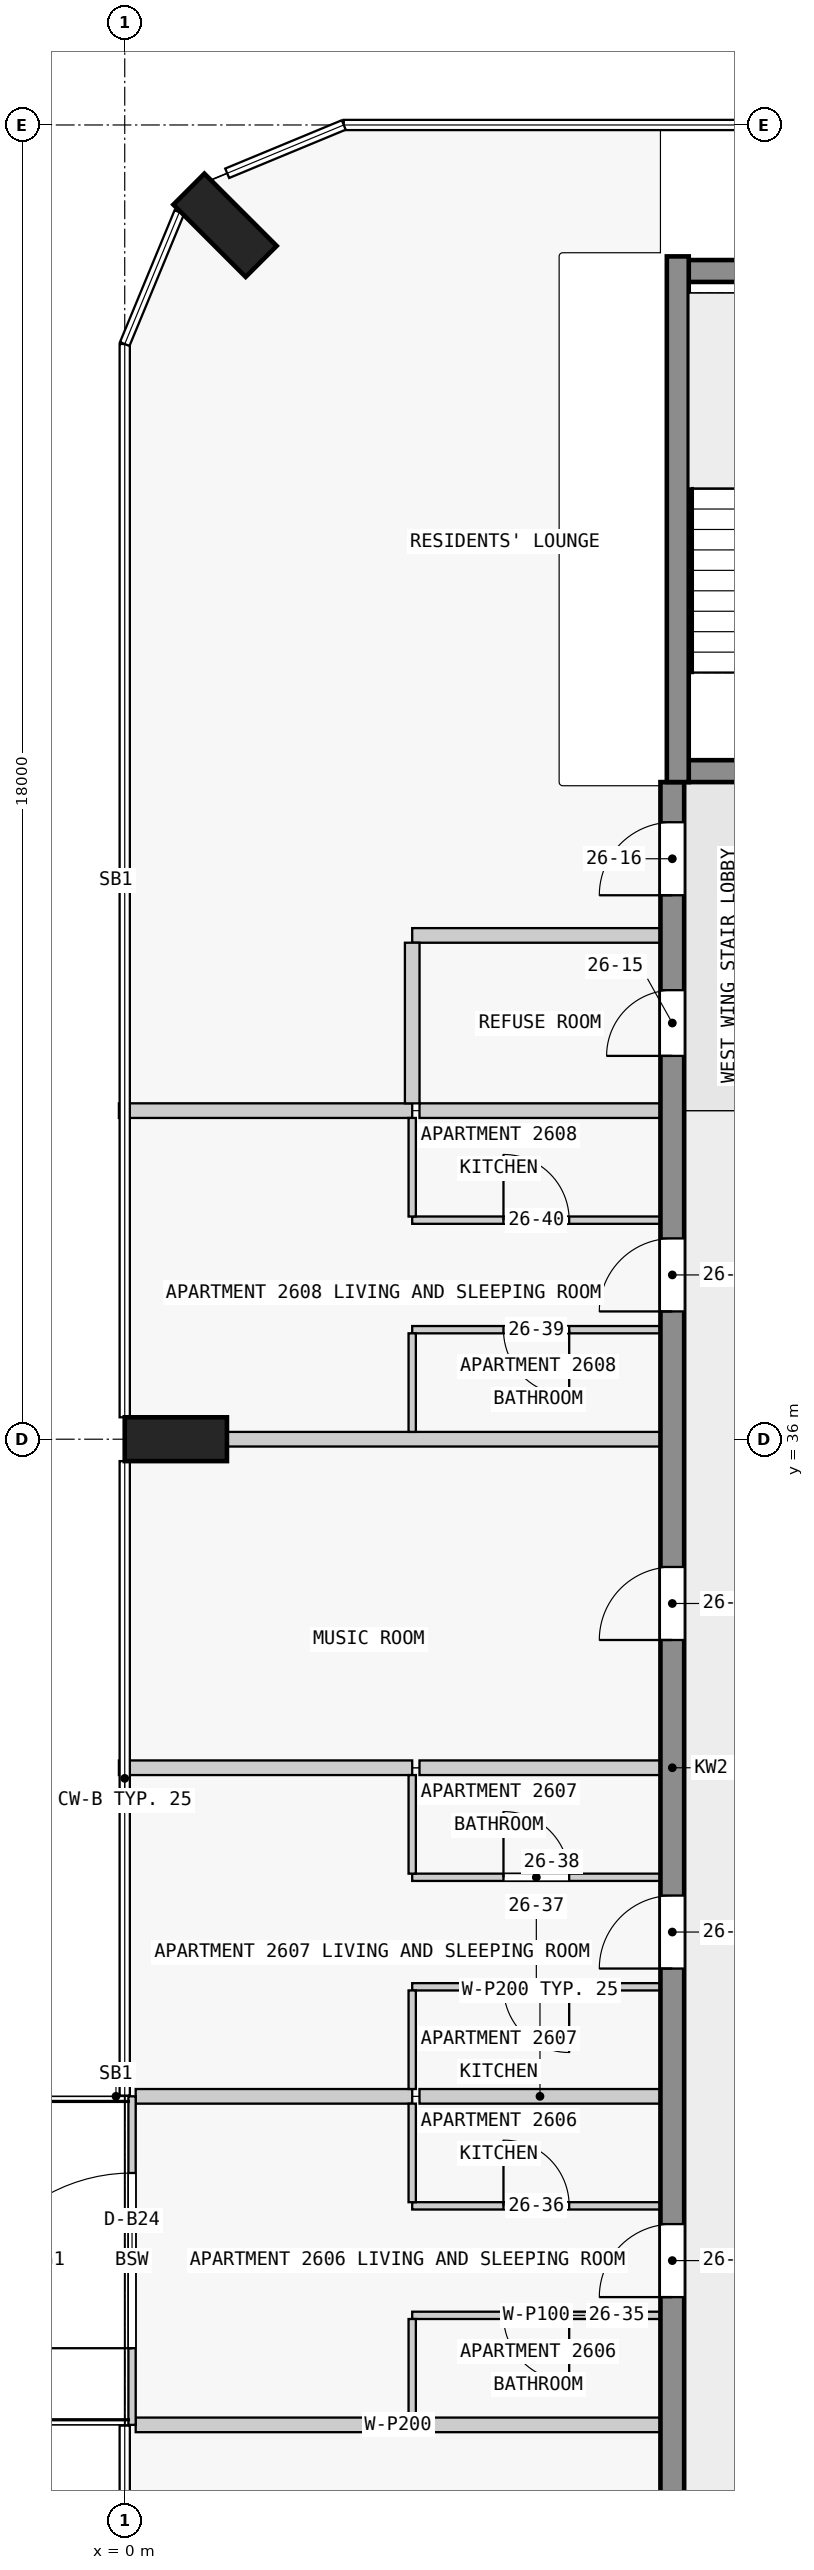
"""IFC4 building model, lengths in metres.
Left out: names, types, materials, properties, quantities, classifications, styles, units other than length and angle.
Written with IfcOpenShell. Run it as: python <this file> out.ifc"""

import sys

from ifc_helpers import new_model, si_unit, direction, frame, frame_2d, origin, origin_2d, place, context, subcontext, project, spatial, rectangle, extrude, element, fill, save


model = new_model("IFC4")
c1 = context("Model", 3, precision=1e-05, world=origin(), true_north=direction((0.0, 1.0)))
c2 = subcontext(c1, "Body", "Model", "MODEL_VIEW")
j1 = project(units=[si_unit("LENGTHUNIT", "METRE"), si_unit("PLANEANGLEUNIT", "RADIAN")], contexts=[c1])
p1 = place(None, origin())
s1 = spatial("IfcSite", under=j1, at=p1, CompositionType="ELEMENT")
p2 = place(p1, origin())
s2 = spatial("IfcBuilding", under=s1, at=p2, CompositionType="ELEMENT")
p3 = place(p2, frame((0.0, 0.0, 102.8)))
s3 = spatial("IfcBuildingStorey", under=s2, at=p3, CompositionType="ELEMENT", Elevation=102.8)
for number, where, z_axis, x_axis in (
    (1, (1.374, 52.626, 0.0), (0.0, 0.0, 1.0), (0.707, 0.707, 0.0)),
    (2, (0.7, 36.0, 0.0), (0.0, 0.0, 1.0), (0.0, 1.0, 0.0)),
):
    element("IfcColumn", number, at=place(p3, frame(where, z_axis=z_axis, x_axis=x_axis)), inside=s3, PredefinedType="COLUMN", context=c2, shape_type="SweptSolid", body=[
        extrude(rectangle(XDim=0.6, YDim=1.4, at=origin_2d()), origin(), (0.0, 0.0, 1.0), 3.5),
    ])
p4 = place(p3, frame((7.725, 45.15, 0.0), z_axis=(0.0, 0.0, 1.0), x_axis=(1.0, 0.0, 0.0)))
e3 = element("IfcWall", 3, at=p4, inside=s3, PredefinedType="SHEAR", context=c2, shape_type="SweptSolid", body=[
    extrude(rectangle(XDim=2.55, YDim=0.3, at=frame_2d((1.275, 0.0))), origin(), (0.0, 0.0, 1.0), 3.5),
])
p5 = place(p4, frame((0.725, 0.0, 0.0)))
e4 = element("IfcOpeningElement", 4, at=p5, cuts=e3, PredefinedType="OPENING", context=c2, shape_type="SweptSolid", body=[
    extrude(rectangle(XDim=1.1, YDim=2.1, at=frame_2d((0.55, 1.05))), frame((0.0, 0.16, 0.0), z_axis=(0.0, -1.0, 0.0), x_axis=(1.0, 0.0, 0.0)), (0.0, 0.0, 1.0), 0.32),
])
p6 = place(p3, frame((7.725, 52.0, 0.0), z_axis=(0.0, 0.0, 1.0), x_axis=(1.0, 0.0, 0.0)))
e5 = element("IfcWall", 5, at=p6, inside=s3, PredefinedType="SHEAR", context=c2, shape_type="SweptSolid", body=[
    extrude(rectangle(XDim=2.55, YDim=0.3, at=frame_2d((1.275, 0.0))), origin(), (0.0, 0.0, 1.0), 3.5),
])
p7 = place(p3, frame((7.575, 45.0, 0.0), z_axis=(0.0, 0.0, 1.0), x_axis=(0.0, 1.0, 0.0)))
e6 = element("IfcWall", 6, at=p7, inside=s3, PredefinedType="SHEAR", context=c2, shape_type="SweptSolid", body=[
    extrude(rectangle(XDim=7.2, YDim=0.3, at=frame_2d((3.6, 0.0))), origin(), (0.0, 0.0, 1.0), 3.5),
])
p8 = place(p3, frame((7.5, 18.0, 0.0), z_axis=(0.0, 0.0, 1.0), x_axis=(0.0, 1.0, 0.0)))
e7 = element("IfcWall", 7, at=p8, inside=s3, PredefinedType="SHEAR", context=c2, shape_type="SweptSolid", body=[
    extrude(rectangle(XDim=27.0, YDim=0.325, at=frame_2d((13.5, 0.0))), origin(), (0.0, 0.0, 1.0), 3.25),
])
p9 = place(p8, frame((1.75, 0.0, 0.0)))
e8 = element("IfcOpeningElement", 8, at=p9, cuts=e7, PredefinedType="OPENING", context=c2, shape_type="SweptSolid", body=[
    extrude(rectangle(XDim=1.0, YDim=2.1, at=frame_2d((0.5, 1.05))), frame((0.0, 0.172, 0.0), z_axis=(0.0, -1.0, 0.0), x_axis=(1.0, 0.0, 0.0)), (0.0, 0.0, 1.0), 0.345),
])
p10 = place(p8, frame((6.25, 0.0, 0.0)))
e9 = element("IfcOpeningElement", 9, at=p10, cuts=e7, PredefinedType="OPENING", context=c2, shape_type="SweptSolid", body=[
    extrude(rectangle(XDim=1.0, YDim=2.1, at=frame_2d((0.5, 1.05))), frame((0.0, 0.172, 0.0), z_axis=(0.0, -1.0, 0.0), x_axis=(1.0, 0.0, 0.0)), (0.0, 0.0, 1.0), 0.345),
])
p11 = place(p8, frame((10.75, 0.0, 0.0)))
e10 = element("IfcOpeningElement", 10, at=p11, cuts=e7, PredefinedType="OPENING", context=c2, shape_type="SweptSolid", body=[
    extrude(rectangle(XDim=1.0, YDim=2.1, at=frame_2d((0.5, 1.05))), frame((0.0, 0.172, 0.0), z_axis=(0.0, -1.0, 0.0), x_axis=(1.0, 0.0, 0.0)), (0.0, 0.0, 1.0), 0.345),
])
p12 = place(p8, frame((15.25, 0.0, 0.0)))
e11 = element("IfcOpeningElement", 11, at=p12, cuts=e7, PredefinedType="OPENING", context=c2, shape_type="SweptSolid", body=[
    extrude(rectangle(XDim=1.0, YDim=2.1, at=frame_2d((0.5, 1.05))), frame((0.0, 0.172, 0.0), z_axis=(0.0, -1.0, 0.0), x_axis=(1.0, 0.0, 0.0)), (0.0, 0.0, 1.0), 0.345),
])
p13 = place(p8, frame((19.75, 0.0, 0.0)))
e12 = element("IfcOpeningElement", 12, at=p13, cuts=e7, PredefinedType="OPENING", context=c2, shape_type="SweptSolid", body=[
    extrude(rectangle(XDim=1.0, YDim=2.1, at=frame_2d((0.5, 1.05))), frame((0.0, 0.172, 0.0), z_axis=(0.0, -1.0, 0.0), x_axis=(1.0, 0.0, 0.0)), (0.0, 0.0, 1.0), 0.345),
])
p14 = place(p8, frame((23.25, 0.0, 0.0)))
e13 = element("IfcOpeningElement", 13, at=p14, cuts=e7, PredefinedType="OPENING", context=c2, shape_type="SweptSolid", body=[
    extrude(rectangle(XDim=0.9, YDim=2.1, at=frame_2d((0.45, 1.05))), frame((0.0, 0.172, 0.0), z_axis=(0.0, -1.0, 0.0), x_axis=(1.0, 0.0, 0.0)), (0.0, 0.0, 1.0), 0.345),
])
p15 = place(p8, frame((25.45, 0.0, 0.0)))
e14 = element("IfcOpeningElement", 14, at=p15, cuts=e7, PredefinedType="OPENING", context=c2, shape_type="SweptSolid", body=[
    extrude(rectangle(XDim=1.0, YDim=2.1, at=frame_2d((0.5, 1.05))), frame((0.0, 0.172, 0.0), z_axis=(0.0, -1.0, 0.0), x_axis=(1.0, 0.0, 0.0)), (0.0, 0.0, 1.0), 0.345),
])
p16 = place(p3, frame((0.1, 22.5, 0.0), z_axis=(0.0, 0.0, 1.0), x_axis=(0.0, 1.0, 0.0)))
e15 = element("IfcWall", 15, at=p16, inside=s3, PredefinedType="STANDARD", context=c2, shape_type="SweptSolid", body=[
    extrude(rectangle(XDim=4.5, YDim=0.1, at=frame_2d((2.25, 0.0))), origin(), (0.0, 0.0, 1.0), 3.25),
])
p17 = place(p16, frame((1.05, 0.0, 0.0)))
e16 = element("IfcOpeningElement", 16, at=p17, cuts=e15, PredefinedType="OPENING", context=c2, shape_type="SweptSolid", body=[
    extrude(rectangle(XDim=2.4, YDim=2.4, at=frame_2d((1.2, 1.2))), frame((0.0, 0.06, 0.0), z_axis=(0.0, -1.0, 0.0), x_axis=(1.0, 0.0, 0.0)), (0.0, 0.0, 1.0), 0.12),
])
p18 = place(p3, frame((7.337, 22.5, 0.0), z_axis=(0.0, 0.0, 1.0), x_axis=(-1.0, 0.0, 0.0)))
e17 = element("IfcWall", 17, at=p18, inside=s3, PredefinedType="PARTITIONING", context=c2, shape_type="SweptSolid", body=[
    extrude(rectangle(XDim=7.188, YDim=0.2, at=frame_2d((3.594, 0.0))), origin(), (0.0, 0.0, 1.0), 3.25),
])
p19 = place(p3, frame((7.337, 24.0, 0.0), z_axis=(0.0, 0.0, 1.0), x_axis=(-1.0, 0.0, 0.0)))
e18 = element("IfcWall", 18, at=p19, inside=s3, PredefinedType="PARTITIONING", context=c2, shape_type="SweptSolid", body=[
    extrude(rectangle(XDim=3.4, YDim=0.1, at=frame_2d((1.7, 0.0))), origin(), (0.0, 0.0, 1.0), 3.25),
])
p20 = place(p19, frame((1.25, 0.0, 0.0)))
e19 = element("IfcOpeningElement", 19, at=p20, cuts=e18, PredefinedType="OPENING", context=c2, shape_type="SweptSolid", body=[
    extrude(rectangle(XDim=0.9, YDim=2.1, at=frame_2d((0.45, 1.05))), frame((0.0, 0.06, 0.0), z_axis=(0.0, -1.0, 0.0), x_axis=(1.0, 0.0, 0.0)), (0.0, 0.0, 1.0), 0.12),
])
p21 = place(p3, frame((3.938, 25.5, 0.0), z_axis=(0.0, 0.0, 1.0), x_axis=(1.0, 0.0, 0.0)))
e20 = element("IfcWall", 20, at=p21, inside=s3, PredefinedType="PARTITIONING", context=c2, shape_type="SweptSolid", body=[
    extrude(rectangle(XDim=3.4, YDim=0.1, at=frame_2d((1.7, 0.0))), origin(), (0.0, 0.0, 1.0), 3.25),
])
p22 = place(p21, frame((1.25, 0.0, 0.0)))
e21 = element("IfcOpeningElement", 21, at=p22, cuts=e20, PredefinedType="OPENING", context=c2, shape_type="SweptSolid", body=[
    extrude(rectangle(XDim=0.9, YDim=2.1, at=frame_2d((0.45, 1.05))), frame((0.0, 0.06, 0.0), z_axis=(0.0, -1.0, 0.0), x_axis=(1.0, 0.0, 0.0)), (0.0, 0.0, 1.0), 0.12),
])
p23 = place(p3, frame((7.337, 27.0, 0.0), z_axis=(0.0, 0.0, 1.0), x_axis=(-1.0, 0.0, 0.0)))
e22 = element("IfcWall", 22, at=p23, inside=s3, PredefinedType="PARTITIONING", context=c2, shape_type="SweptSolid", body=[
    extrude(rectangle(XDim=3.3, YDim=0.2, at=frame_2d((1.65, 0.0))), origin(), (0.0, 0.0, 1.0), 3.25),
])
p24 = place(p3, frame((0.15, 27.0, 0.0), z_axis=(0.0, 0.0, 1.0), x_axis=(1.0, 0.0, 0.0)))
e23 = element("IfcWall", 23, at=p24, inside=s3, PredefinedType="PARTITIONING", context=c2, shape_type="SweptSolid", body=[
    extrude(rectangle(XDim=3.788, YDim=0.2, at=frame_2d((1.894, 0.0))), origin(), (0.0, 0.0, 1.0), 3.25),
])
p25 = place(p3, frame((7.337, 28.5, 0.0), z_axis=(0.0, 0.0, 1.0), x_axis=(-1.0, 0.0, 0.0)))
e24 = element("IfcWall", 24, at=p25, inside=s3, PredefinedType="PARTITIONING", context=c2, shape_type="SweptSolid", body=[
    extrude(rectangle(XDim=3.4, YDim=0.1, at=frame_2d((1.7, 0.0))), origin(), (0.0, 0.0, 1.0), 3.25),
])
p26 = place(p25, frame((1.25, 0.0, 0.0)))
e25 = element("IfcOpeningElement", 25, at=p26, cuts=e24, PredefinedType="OPENING", context=c2, shape_type="SweptSolid", body=[
    extrude(rectangle(XDim=0.9, YDim=2.1, at=frame_2d((0.45, 1.05))), frame((0.0, 0.06, 0.0), z_axis=(0.0, -1.0, 0.0), x_axis=(1.0, 0.0, 0.0)), (0.0, 0.0, 1.0), 0.12),
])
p27 = place(p3, frame((3.938, 30.0, 0.0), z_axis=(0.0, 0.0, 1.0), x_axis=(1.0, 0.0, 0.0)))
e26 = element("IfcWall", 26, at=p27, inside=s3, PredefinedType="PARTITIONING", context=c2, shape_type="SweptSolid", body=[
    extrude(rectangle(XDim=3.4, YDim=0.1, at=frame_2d((1.7, 0.0))), origin(), (0.0, 0.0, 1.0), 3.25),
])
p28 = place(p27, frame((1.25, 0.0, 0.0)))
e27 = element("IfcOpeningElement", 27, at=p28, cuts=e26, PredefinedType="OPENING", context=c2, shape_type="SweptSolid", body=[
    extrude(rectangle(XDim=0.9, YDim=2.1, at=frame_2d((0.45, 1.05))), frame((0.0, 0.06, 0.0), z_axis=(0.0, -1.0, 0.0), x_axis=(1.0, 0.0, 0.0)), (0.0, 0.0, 1.0), 0.12),
])
p29 = place(p3, frame((7.337, 31.5, 0.0), z_axis=(0.0, 0.0, 1.0), x_axis=(-1.0, 0.0, 0.0)))
e28 = element("IfcWall", 28, at=p29, inside=s3, PredefinedType="PARTITIONING", context=c2, shape_type="SweptSolid", body=[
    extrude(rectangle(XDim=3.3, YDim=0.2, at=frame_2d((1.65, 0.0))), origin(), (0.0, 0.0, 1.0), 3.25),
])
p30 = place(p3, frame((-0.08, 31.5, 0.0), z_axis=(0.0, 0.0, 1.0), x_axis=(1.0, 0.0, 0.0)))
e29 = element("IfcWall", 29, at=p30, inside=s3, PredefinedType="PARTITIONING", context=c2, shape_type="SweptSolid", body=[
    extrude(rectangle(XDim=4.018, YDim=0.2, at=frame_2d((2.009, 0.0))), origin(), (0.0, 0.0, 1.0), 3.25),
])
p31 = place(p3, frame((7.337, 36.0, 0.0), z_axis=(0.0, 0.0, 1.0), x_axis=(-1.0, 0.0, 0.0)))
e30 = element("IfcWall", 30, at=p31, inside=s3, PredefinedType="PARTITIONING", context=c2, shape_type="SweptSolid", body=[
    extrude(rectangle(XDim=5.938, YDim=0.2, at=frame_2d((2.969, 0.0))), origin(), (0.0, 0.0, 1.0), 3.25),
])
p32 = place(p3, frame((7.337, 37.5, 0.0), z_axis=(0.0, 0.0, 1.0), x_axis=(-1.0, 0.0, 0.0)))
e31 = element("IfcWall", 31, at=p32, inside=s3, PredefinedType="PARTITIONING", context=c2, shape_type="SweptSolid", body=[
    extrude(rectangle(XDim=3.4, YDim=0.1, at=frame_2d((1.7, 0.0))), origin(), (0.0, 0.0, 1.0), 3.25),
])
p33 = place(p32, frame((1.25, 0.0, 0.0)))
e32 = element("IfcOpeningElement", 32, at=p33, cuts=e31, PredefinedType="OPENING", context=c2, shape_type="SweptSolid", body=[
    extrude(rectangle(XDim=0.9, YDim=2.1, at=frame_2d((0.45, 1.05))), frame((0.0, 0.06, 0.0), z_axis=(0.0, -1.0, 0.0), x_axis=(1.0, 0.0, 0.0)), (0.0, 0.0, 1.0), 0.12),
])
p34 = place(p3, frame((3.938, 39.0, 0.0), z_axis=(0.0, 0.0, 1.0), x_axis=(1.0, 0.0, 0.0)))
e33 = element("IfcWall", 33, at=p34, inside=s3, PredefinedType="PARTITIONING", context=c2, shape_type="SweptSolid", body=[
    extrude(rectangle(XDim=3.4, YDim=0.1, at=frame_2d((1.7, 0.0))), origin(), (0.0, 0.0, 1.0), 3.25),
])
p35 = place(p34, frame((1.25, 0.0, 0.0)))
e34 = element("IfcOpeningElement", 34, at=p35, cuts=e33, PredefinedType="OPENING", context=c2, shape_type="SweptSolid", body=[
    extrude(rectangle(XDim=0.9, YDim=2.1, at=frame_2d((0.45, 1.05))), frame((0.0, 0.06, 0.0), z_axis=(0.0, -1.0, 0.0), x_axis=(1.0, 0.0, 0.0)), (0.0, 0.0, 1.0), 0.12),
])
p36 = place(p3, frame((7.337, 40.5, 0.0), z_axis=(0.0, 0.0, 1.0), x_axis=(-1.0, 0.0, 0.0)))
e35 = element("IfcWall", 35, at=p36, inside=s3, PredefinedType="PARTITIONING", context=c2, shape_type="SweptSolid", body=[
    extrude(rectangle(XDim=3.3, YDim=0.2, at=frame_2d((1.65, 0.0))), origin(), (0.0, 0.0, 1.0), 3.25),
])
p37 = place(p3, frame((-0.08, 40.5, 0.0), z_axis=(0.0, 0.0, 1.0), x_axis=(1.0, 0.0, 0.0)))
e36 = element("IfcWall", 36, at=p37, inside=s3, PredefinedType="PARTITIONING", context=c2, shape_type="SweptSolid", body=[
    extrude(rectangle(XDim=4.018, YDim=0.2, at=frame_2d((2.009, 0.0))), origin(), (0.0, 0.0, 1.0), 3.25),
])
p38 = place(p3, frame((7.337, 42.9, 0.0), z_axis=(0.0, 0.0, 1.0), x_axis=(-1.0, 0.0, 0.0)))
e37 = element("IfcWall", 37, at=p38, inside=s3, PredefinedType="PARTITIONING", context=c2, shape_type="SweptSolid", body=[
    extrude(rectangle(XDim=3.4, YDim=0.2, at=frame_2d((1.7, 0.0))), origin(), (0.0, 0.0, 1.0), 3.25),
])
for number, where, z_axis, x_axis in (
    (38, (3.938, 23.95, 0.0), (0.0, 0.0, 1.0), (0.0, -1.0, 0.0)),
    (39, (3.938, 26.9, 0.0), (0.0, 0.0, 1.0), (0.0, -1.0, 0.0)),
    (40, (3.938, 28.45, 0.0), (0.0, 0.0, 1.0), (0.0, -1.0, 0.0)),
    (41, (3.938, 31.4, 0.0), (0.0, 0.0, 1.0), (0.0, -1.0, 0.0)),
    (42, (3.938, 37.45, 0.0), (0.0, 0.0, 1.0), (0.0, -1.0, 0.0)),
    (43, (3.938, 40.4, 0.0), (0.0, 0.0, 1.0), (0.0, -1.0, 0.0)),
):
    element("IfcWall", number, at=place(p3, frame(where, z_axis=z_axis, x_axis=x_axis)), inside=s3, PredefinedType="PARTITIONING", context=c2, shape_type="SweptSolid", body=[
        extrude(rectangle(XDim=1.35, YDim=0.1, at=frame_2d((0.675, 0.0))), origin(), (0.0, 0.0, 1.0), 3.25),
    ])
p39 = place(p3, frame((3.938, 42.8, 0.0), z_axis=(0.0, 0.0, 1.0), x_axis=(0.0, -1.0, 0.0)))
e44 = element("IfcWall", 44, at=p39, inside=s3, PredefinedType="PARTITIONING", context=c2, shape_type="SweptSolid", body=[
    extrude(rectangle(XDim=2.2, YDim=0.2, at=frame_2d((1.1, 0.0))), origin(), (0.0, 0.0, 1.0), 3.25),
])
p40 = place(p17, origin())
e45 = element("IfcDoor", 45, at=p40, inside=s3, OperationType="SINGLE_SWING_LEFT", PredefinedType="DOOR", context=c2, shape_type="SweptSolid", body=[
    extrude(rectangle(XDim=2.4, YDim=2.4, at=frame_2d((1.2, 1.2))), frame((0.0, 0.025, 0.0), z_axis=(0.0, -1.0, 0.0), x_axis=(1.0, 0.0, 0.0)), (0.0, 0.0, 1.0), 0.05),
])
fill(e16, e45)
p41 = place(p10, origin())
e46 = element("IfcDoor", 46, at=p41, inside=s3, OperationType="SINGLE_SWING_LEFT", PredefinedType="DOOR", context=c2, shape_type="SweptSolid", body=[
    extrude(rectangle(XDim=1.0, YDim=2.1, at=frame_2d((0.5, 1.05))), frame((0.0, 0.025, 0.0), z_axis=(0.0, -1.0, 0.0), x_axis=(1.0, 0.0, 0.0)), (0.0, 0.0, 1.0), 0.05),
])
fill(e9, e46)
p42 = place(p11, origin())
e47 = element("IfcDoor", 47, at=p42, inside=s3, OperationType="SINGLE_SWING_LEFT", PredefinedType="DOOR", context=c2, shape_type="SweptSolid", body=[
    extrude(rectangle(XDim=1.0, YDim=2.1, at=frame_2d((0.5, 1.05))), frame((0.0, 0.025, 0.0), z_axis=(0.0, -1.0, 0.0), x_axis=(1.0, 0.0, 0.0)), (0.0, 0.0, 1.0), 0.05),
])
fill(e10, e47)
p43 = place(p12, origin())
e48 = element("IfcDoor", 48, at=p43, inside=s3, OperationType="SINGLE_SWING_RIGHT", PredefinedType="DOOR", context=c2, shape_type="SweptSolid", body=[
    extrude(rectangle(XDim=1.0, YDim=2.1, at=frame_2d((0.5, 1.05))), frame((0.0, 0.025, 0.0), z_axis=(0.0, -1.0, 0.0), x_axis=(1.0, 0.0, 0.0)), (0.0, 0.0, 1.0), 0.05),
])
fill(e11, e48)
p44 = place(p13, origin())
e49 = element("IfcDoor", 49, at=p44, inside=s3, OperationType="SINGLE_SWING_RIGHT", PredefinedType="DOOR", context=c2, shape_type="SweptSolid", body=[
    extrude(rectangle(XDim=1.0, YDim=2.1, at=frame_2d((0.5, 1.05))), frame((0.0, 0.025, 0.0), z_axis=(0.0, -1.0, 0.0), x_axis=(1.0, 0.0, 0.0)), (0.0, 0.0, 1.0), 0.05),
])
fill(e12, e49)
p45 = place(p14, origin())
e50 = element("IfcDoor", 50, at=p45, inside=s3, OperationType="SINGLE_SWING_RIGHT", PredefinedType="DOOR", context=c2, shape_type="SweptSolid", body=[
    extrude(rectangle(XDim=0.9, YDim=2.1, at=frame_2d((0.45, 1.05))), frame((0.0, 0.025, 0.0), z_axis=(0.0, -1.0, 0.0), x_axis=(1.0, 0.0, 0.0)), (0.0, 0.0, 1.0), 0.05),
])
fill(e13, e50)
p46 = place(p15, origin())
e51 = element("IfcDoor", 51, at=p46, inside=s3, OperationType="SINGLE_SWING_RIGHT", PredefinedType="DOOR", context=c2, shape_type="SweptSolid", body=[
    extrude(rectangle(XDim=1.0, YDim=2.1, at=frame_2d((0.5, 1.05))), frame((0.0, 0.025, 0.0), z_axis=(0.0, -1.0, 0.0), x_axis=(1.0, 0.0, 0.0)), (0.0, 0.0, 1.0), 0.05),
])
fill(e14, e51)
p47 = place(p20, origin())
e52 = element("IfcDoor", 52, at=p47, inside=s3, OperationType="SINGLE_SWING_LEFT", PredefinedType="DOOR", context=c2, shape_type="SweptSolid", body=[
    extrude(rectangle(XDim=0.9, YDim=2.1, at=frame_2d((0.45, 1.05))), frame((0.0, 0.025, 0.0), z_axis=(0.0, -1.0, 0.0), x_axis=(1.0, 0.0, 0.0)), (0.0, 0.0, 1.0), 0.05),
])
fill(e19, e52)
p48 = place(p22, origin())
e53 = element("IfcDoor", 53, at=p48, inside=s3, OperationType="SINGLE_SWING_LEFT", PredefinedType="DOOR", context=c2, shape_type="SweptSolid", body=[
    extrude(rectangle(XDim=0.9, YDim=2.1, at=frame_2d((0.45, 1.05))), frame((0.0, 0.025, 0.0), z_axis=(0.0, -1.0, 0.0), x_axis=(1.0, 0.0, 0.0)), (0.0, 0.0, 1.0), 0.05),
])
fill(e21, e53)
p49 = place(p26, origin())
e54 = element("IfcDoor", 54, at=p49, inside=s3, OperationType="SINGLE_SWING_LEFT", PredefinedType="DOOR", context=c2, shape_type="SweptSolid", body=[
    extrude(rectangle(XDim=0.9, YDim=2.1, at=frame_2d((0.45, 1.05))), frame((0.0, 0.025, 0.0), z_axis=(0.0, -1.0, 0.0), x_axis=(1.0, 0.0, 0.0)), (0.0, 0.0, 1.0), 0.05),
])
fill(e25, e54)
p50 = place(p28, origin())
e55 = element("IfcDoor", 55, at=p50, inside=s3, OperationType="SINGLE_SWING_LEFT", PredefinedType="DOOR", context=c2, shape_type="SweptSolid", body=[
    extrude(rectangle(XDim=0.9, YDim=2.1, at=frame_2d((0.45, 1.05))), frame((0.0, 0.025, 0.0), z_axis=(0.0, -1.0, 0.0), x_axis=(1.0, 0.0, 0.0)), (0.0, 0.0, 1.0), 0.05),
])
fill(e27, e55)
p51 = place(p33, origin())
e56 = element("IfcDoor", 56, at=p51, inside=s3, OperationType="SINGLE_SWING_LEFT", PredefinedType="DOOR", context=c2, shape_type="SweptSolid", body=[
    extrude(rectangle(XDim=0.9, YDim=2.1, at=frame_2d((0.45, 1.05))), frame((0.0, 0.025, 0.0), z_axis=(0.0, -1.0, 0.0), x_axis=(1.0, 0.0, 0.0)), (0.0, 0.0, 1.0), 0.05),
])
fill(e32, e56)
p52 = place(p35, origin())
e57 = element("IfcDoor", 57, at=p52, inside=s3, OperationType="SINGLE_SWING_LEFT", PredefinedType="DOOR", context=c2, shape_type="SweptSolid", body=[
    extrude(rectangle(XDim=0.9, YDim=2.1, at=frame_2d((0.45, 1.05))), frame((0.0, 0.025, 0.0), z_axis=(0.0, -1.0, 0.0), x_axis=(1.0, 0.0, 0.0)), (0.0, 0.0, 1.0), 0.05),
])
fill(e34, e57)
save(model, sys.argv[1])
